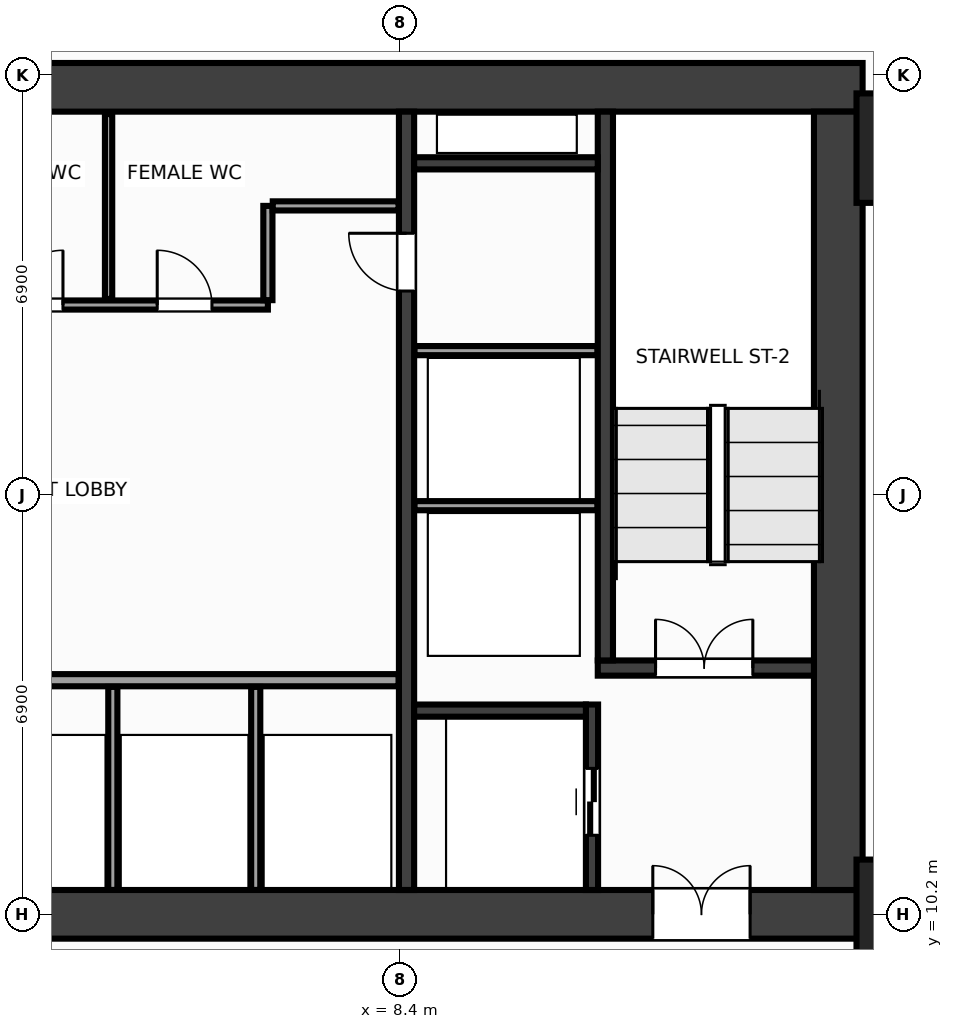
"""IFC4 building model, lengths in metres.
Left out: names, types, materials, properties, quantities, classifications, styles, units other than length and angle.
Written with IfcOpenShell. Run it as: python <this file> out.ifc"""

import sys

from ifc_helpers import new_model, si_unit, direction, frame, frame_2d, origin, origin_2d, place, context, subcontext, project, spatial, rectangle, extrude, source, transform, mapped, element, fill, save


model = new_model("IFC4")
c1 = context("Model", 3, precision=1e-05, world=origin(), true_north=direction((0.0, 1.0)))
c2 = subcontext(c1, "Body", "Model", "MODEL_VIEW")
j1 = project(units=[si_unit("LENGTHUNIT", "METRE"), si_unit("PLANEANGLEUNIT", "RADIAN")], contexts=[c1])
p1 = place(None, origin())
s1 = spatial("IfcSite", under=j1, at=p1, CompositionType="ELEMENT")
p2 = place(p1, origin())
s2 = spatial("IfcBuilding", under=s1, at=p2, CompositionType="ELEMENT")
p3 = place(p2, frame((0.0, 0.0, 52.4)))
s3 = spatial("IfcBuildingStorey", under=s2, at=p3, CompositionType="ELEMENT", Elevation=52.4)
m1 = source(origin(), c2, "Body", "SweptSolid", [
    extrude(rectangle(XDim=32.0, YDim=0.8, at=frame_2d((16.0, 0.0))), origin(), (0.0, 0.0, 1.0), 3.6),
])
p4 = place(p3, frame((-16.0, 23.8, 0.0), z_axis=(0.0, 0.0, 1.0), x_axis=(1.0, 0.0, 0.0)))
e1 = element("IfcWall", 1, at=p4, inside=s3, PredefinedType="SHEAR", context=c2, shape_type="MappedRepresentation", body=[
    mapped(m1, transform((0.0, 0.0, 0.0), x_axis=(1.0, 0.0, 0.0), y_axis=(0.0, 1.0, 0.0), z_axis=(0.0, 0.0, 1.0), scale=1.0)),
])
p5 = place(p3, frame((-16.0, 10.2, 0.0), z_axis=(0.0, 0.0, 1.0), x_axis=(1.0, 0.0, 0.0)))
e2 = element("IfcWall", 2, at=p5, inside=s3, PredefinedType="SHEAR", context=c2, shape_type="MappedRepresentation", body=[
    mapped(m1, transform((0.0, 0.0, 0.0), x_axis=(1.0, 0.0, 0.0), y_axis=(0.0, 1.0, 0.0), z_axis=(0.0, 0.0, 1.0), scale=1.0)),
])
p6 = place(p5, frame((1.85, 0.0, 0.0)))
e3 = element("IfcOpeningElement", 3, at=p6, cuts=e2, PredefinedType="OPENING", context=c2, shape_type="SweptSolid", body=[
    extrude(rectangle(XDim=1.6, YDim=2.15, at=frame_2d((0.8, 1.075))), frame((0.0, 0.412, 0.0), z_axis=(0.0, -1.0, 0.0), x_axis=(1.0, 0.0, 0.0)), (0.0, 0.0, 1.0), 0.824),
])
p7 = place(p5, frame((28.55, 0.0, 0.0)))
e4 = element("IfcOpeningElement", 4, at=p7, cuts=e2, PredefinedType="OPENING", context=c2, shape_type="SweptSolid", body=[
    extrude(rectangle(XDim=1.6, YDim=2.15, at=frame_2d((0.8, 1.075))), frame((0.0, 0.412, 0.0), z_axis=(0.0, -1.0, 0.0), x_axis=(1.0, 0.0, 0.0)), (0.0, 0.0, 1.0), 0.824),
])
p8 = place(p5, frame((15.25, 0.0, 0.0)))
e5 = element("IfcOpeningElement", 5, at=p8, cuts=e2, PredefinedType="OPENING", context=c2, shape_type="SweptSolid", body=[
    extrude(rectangle(XDim=1.5, YDim=2.2, at=frame_2d((0.75, 1.1))), frame((0.0, 0.412, 0.0), z_axis=(0.0, -1.0, 0.0), x_axis=(1.0, 0.0, 0.0)), (0.0, 0.0, 1.0), 0.824),
])
m2 = source(origin(), c2, "Body", "SweptSolid", [
    extrude(rectangle(XDim=12.8, YDim=0.8, at=frame_2d((6.4, 0.0))), origin(), (0.0, 0.0, 1.0), 3.6),
])
p9 = place(p3, frame((15.6, 10.6, 0.0), z_axis=(0.0, 0.0, 1.0), x_axis=(0.0, 1.0, 0.0)))
e6 = element("IfcWall", 6, at=p9, inside=s3, PredefinedType="SHEAR", context=c2, shape_type="MappedRepresentation", body=[
    mapped(m2, transform((0.0, 0.0, 0.0), x_axis=(1.0, 0.0, 0.0), y_axis=(0.0, 1.0, 0.0), z_axis=(0.0, 0.0, 1.0), scale=1.0)),
])
m3 = source(origin(), c2, "Body", "SweptSolid", [
    extrude(rectangle(XDim=12.8, YDim=0.25, at=frame_2d((6.4, 0.0))), origin(), (0.0, 0.0, 1.0), 3.6),
])
p10 = place(p3, frame((8.5, 10.6, 0.0), z_axis=(0.0, 0.0, 1.0), x_axis=(0.0, 1.0, 0.0)))
e7 = element("IfcWall", 7, at=p10, inside=s3, PredefinedType="SHEAR", context=c2, shape_type="MappedRepresentation", body=[
    mapped(m3, transform((0.0, 0.0, 0.0), x_axis=(1.0, 0.0, 0.0), y_axis=(0.0, 1.0, 0.0), z_axis=(0.0, 0.0, 1.0), scale=1.0)),
])
p11 = place(p10, frame((9.85, 0.0, 0.0)))
e8 = element("IfcOpeningElement", 8, at=p11, cuts=e7, PredefinedType="OPENING", context=c2, shape_type="SweptSolid", body=[
    extrude(rectangle(XDim=0.95, YDim=2.15, at=frame_2d((0.475, 1.075))), frame((0.0, 0.137, 0.0), z_axis=(0.0, -1.0, 0.0), x_axis=(1.0, 0.0, 0.0)), (0.0, 0.0, 1.0), 0.274),
])
m4 = source(origin(), c2, "Body", "SweptSolid", [
    extrude(rectangle(XDim=3.555, YDim=0.25, at=frame_2d((1.777, 0.0))), origin(), (0.0, 0.0, 1.0), 3.6),
])
p12 = place(p3, frame((11.645, 14.25, 0.0), z_axis=(0.0, 0.0, 1.0), x_axis=(1.0, 0.0, 0.0)))
e9 = element("IfcWall", 9, at=p12, inside=s3, PredefinedType="SHEAR", context=c2, shape_type="MappedRepresentation", body=[
    mapped(m4, transform((0.0, 0.0, 0.0), x_axis=(1.0, 0.0, 0.0), y_axis=(0.0, 1.0, 0.0), z_axis=(0.0, 0.0, 1.0), scale=1.0)),
])
p13 = place(p12, frame((0.95, 0.0, 0.0)))
e10 = element("IfcOpeningElement", 10, at=p13, cuts=e9, PredefinedType="OPENING", context=c2, shape_type="SweptSolid", body=[
    extrude(rectangle(XDim=1.6, YDim=2.15, at=frame_2d((0.8, 1.075))), frame((0.0, 0.137, 0.0), z_axis=(0.0, -1.0, 0.0), x_axis=(1.0, 0.0, 0.0)), (0.0, 0.0, 1.0), 0.274),
])
m5 = source(origin(), c2, "Body", "SweptSolid", [
    extrude(rectangle(XDim=9.025, YDim=0.25, at=frame_2d((4.512, 0.0))), origin(), (0.0, 0.0, 1.0), 3.6),
])
p14 = place(p3, frame((11.77, 14.375, 0.0), z_axis=(0.0, 0.0, 1.0), x_axis=(0.0, 1.0, 0.0)))
e11 = element("IfcWall", 11, at=p14, inside=s3, PredefinedType="SHEAR", context=c2, shape_type="MappedRepresentation", body=[
    mapped(m5, transform((0.0, 0.0, 0.0), x_axis=(1.0, 0.0, 0.0), y_axis=(0.0, 1.0, 0.0), z_axis=(0.0, 0.0, 1.0), scale=1.0)),
])
m6 = source(origin(), c2, "Body", "SweptSolid", [
    extrude(rectangle(XDim=3.05, YDim=0.2, at=frame_2d((1.525, 0.0))), origin(), (0.0, 0.0, 1.0), 3.6),
])
p15 = place(p3, frame((11.55, 10.6, 0.0), z_axis=(0.0, 0.0, 1.0), x_axis=(0.0, 1.0, 0.0)))
e12 = element("IfcWall", 12, at=p15, inside=s3, PredefinedType="SHEAR", context=c2, shape_type="MappedRepresentation", body=[
    mapped(m6, transform((0.0, 0.0, 0.0), x_axis=(1.0, 0.0, 0.0), y_axis=(0.0, 1.0, 0.0), z_axis=(0.0, 0.0, 1.0), scale=1.0)),
])
p16 = place(p15, frame((0.9, 0.0, 0.0)))
e13 = element("IfcOpeningElement", 13, at=p16, cuts=e12, PredefinedType="OPENING", context=c2, shape_type="SweptSolid", body=[
    extrude(rectangle(XDim=1.1, YDim=2.15, at=frame_2d((0.55, 1.075))), frame((0.0, 0.112, 0.0), z_axis=(0.0, -1.0, 0.0), x_axis=(1.0, 0.0, 0.0)), (0.0, 0.0, 1.0), 0.224),
])
m7 = source(origin(), c2, "Body", "SweptSolid", [
    extrude(rectangle(XDim=2.825, YDim=0.2, at=frame_2d((1.413, 0.0))), origin(), (0.0, 0.0, 1.0), 3.6),
])
p17 = place(p3, frame((8.625, 13.55, 0.0), z_axis=(0.0, 0.0, 1.0), x_axis=(1.0, 0.0, 0.0)))
e14 = element("IfcWall", 14, at=p17, inside=s3, PredefinedType="SHEAR", context=c2, shape_type="MappedRepresentation", body=[
    mapped(m7, transform((0.0, 0.0, 0.0), x_axis=(1.0, 0.0, 0.0), y_axis=(0.0, 1.0, 0.0), z_axis=(0.0, 0.0, 1.0), scale=1.0)),
])
m8 = source(origin(), c2, "Body", "SweptSolid", [
    extrude(rectangle(XDim=3.02, YDim=0.2, at=frame_2d((1.51, 0.0))), origin(), (0.0, 0.0, 1.0), 3.6),
])
p18 = place(p3, frame((8.625, 22.55, 0.0), z_axis=(0.0, 0.0, 1.0), x_axis=(1.0, 0.0, 0.0)))
e15 = element("IfcWall", 15, at=p18, inside=s3, PredefinedType="SHEAR", context=c2, shape_type="MappedRepresentation", body=[
    mapped(m8, transform((0.0, 0.0, 0.0), x_axis=(1.0, 0.0, 0.0), y_axis=(0.0, 1.0, 0.0), z_axis=(0.0, 0.0, 1.0), scale=1.0)),
])
m9 = source(origin(), c2, "Body", "SweptSolid", [
    extrude(rectangle(XDim=1.8, YDim=1.8, at=origin_2d()), origin(), (0.0, 0.0, 1.0), 3.6),
])
for number, where, z_axis, x_axis in (
    (16, (16.8, 10.2, 0.0), (0.0, 0.0, 1.0), (1.0, 0.0, 0.0)),
    (17, (16.8, 22.8, 0.0), (0.0, 0.0, 1.0), (1.0, 0.0, 0.0)),
):
    element("IfcColumn", number, at=place(p3, frame(where, z_axis=z_axis, x_axis=x_axis)), inside=s3, PredefinedType="COLUMN", context=c2, shape_type="MappedRepresentation", body=[
        mapped(m9, transform((0.0, 0.0, 0.0), x_axis=(1.0, 0.0, 0.0), y_axis=(0.0, 1.0, 0.0), z_axis=(0.0, 0.0, 1.0), scale=1.0)),
    ])
m10 = source(origin(), c2, "Body", "SweptSolid", [
    extrude(rectangle(XDim=3.01, YDim=0.15, at=frame_2d((1.505, 0.0))), origin(), (0.0, 0.0, 1.0), 3.36),
])
for number, where, z_axis, x_axis in (
    (18, (8.63, 16.92, 0.0), (0.0, 0.0, 1.0), (1.0, 0.0, 0.0)),
    (19, (8.63, 19.47, 0.0), (0.0, 0.0, 1.0), (1.0, 0.0, 0.0)),
):
    element("IfcWall", number, at=place(p3, frame(where, z_axis=z_axis, x_axis=x_axis)), inside=s3, PredefinedType="PARTITIONING", context=c2, shape_type="MappedRepresentation", body=[
        mapped(m10, transform((0.0, 0.0, 0.0), x_axis=(1.0, 0.0, 0.0), y_axis=(0.0, 1.0, 0.0), z_axis=(0.0, 0.0, 1.0), scale=1.0)),
    ])
m11 = source(origin(), c2, "Body", "SweptSolid", [
    extrude(rectangle(XDim=7.07, YDim=0.2, at=frame_2d((3.535, 0.0))), origin(), (0.0, 0.0, 1.0), 3.36),
])
p19 = place(p3, frame((1.3, 14.05, 0.0), z_axis=(0.0, 0.0, 1.0), x_axis=(1.0, 0.0, 0.0)))
e20 = element("IfcWall", 20, at=p19, inside=s3, PredefinedType="PARTITIONING", context=c2, shape_type="MappedRepresentation", body=[
    mapped(m11, transform((0.0, 0.0, 0.0), x_axis=(1.0, 0.0, 0.0), y_axis=(0.0, 1.0, 0.0), z_axis=(0.0, 0.0, 1.0), scale=1.0)),
])
m12 = source(origin(), c2, "Body", "SweptSolid", [
    extrude(rectangle(XDim=14.59, YDim=0.15, at=frame_2d((7.295, 0.0))), origin(), (0.0, 0.0, 1.0), 3.36),
])
p20 = place(p3, frame((-8.37, 20.22, 0.0), z_axis=(0.0, 0.0, 1.0), x_axis=(1.0, 0.0, 0.0)))
e21 = element("IfcWall", 21, at=p20, inside=s3, PredefinedType="PARTITIONING", context=c2, shape_type="MappedRepresentation", body=[
    mapped(m12, transform((0.0, 0.0, 0.0), x_axis=(1.0, 0.0, 0.0), y_axis=(0.0, 1.0, 0.0), z_axis=(0.0, 0.0, 1.0), scale=1.0)),
])
p21 = place(p20, frame((4.36, 0.0, 0.0)))
e22 = element("IfcOpeningElement", 22, at=p21, cuts=e21, PredefinedType="OPENING", context=c2, shape_type="SweptSolid", body=[
    extrude(rectangle(XDim=0.9, YDim=2.15, at=frame_2d((0.45, 1.075))), frame((0.0, 0.087, 0.0), z_axis=(0.0, -1.0, 0.0), x_axis=(1.0, 0.0, 0.0)), (0.0, 0.0, 1.0), 0.174),
])
p22 = place(p20, frame((10.32, 0.0, 0.0)))
e23 = element("IfcOpeningElement", 23, at=p22, cuts=e21, PredefinedType="OPENING", context=c2, shape_type="SweptSolid", body=[
    extrude(rectangle(XDim=0.9, YDim=2.15, at=frame_2d((0.45, 1.075))), frame((0.0, 0.087, 0.0), z_axis=(0.0, -1.0, 0.0), x_axis=(1.0, 0.0, 0.0)), (0.0, 0.0, 1.0), 0.174),
])
p23 = place(p20, frame((12.77, 0.0, 0.0)))
e24 = element("IfcOpeningElement", 24, at=p23, cuts=e21, PredefinedType="OPENING", context=c2, shape_type="SweptSolid", body=[
    extrude(rectangle(XDim=0.9, YDim=2.15, at=frame_2d((0.45, 1.075))), frame((0.0, 0.087, 0.0), z_axis=(0.0, -1.0, 0.0), x_axis=(1.0, 0.0, 0.0)), (0.0, 0.0, 1.0), 0.174),
])
m13 = source(origin(), c2, "Body", "SweptSolid", [
    extrude(rectangle(XDim=1.55, YDim=0.15, at=frame_2d((0.775, 0.0))), origin(), (0.0, 0.0, 1.0), 3.36),
])
p24 = place(p3, frame((6.22, 20.3, 0.0), z_axis=(0.0, 0.0, 1.0), x_axis=(0.0, 1.0, 0.0)))
e25 = element("IfcWall", 25, at=p24, inside=s3, PredefinedType="PARTITIONING", context=c2, shape_type="MappedRepresentation", body=[
    mapped(m13, transform((0.0, 0.0, 0.0), x_axis=(1.0, 0.0, 0.0), y_axis=(0.0, 1.0, 0.0), z_axis=(0.0, 0.0, 1.0), scale=1.0)),
])
m14 = source(origin(), c2, "Body", "SweptSolid", [
    extrude(rectangle(XDim=2.07, YDim=0.15, at=frame_2d((1.035, 0.0))), origin(), (0.0, 0.0, 1.0), 3.36),
])
p25 = place(p3, frame((6.3, 21.85, 0.0), z_axis=(0.0, 0.0, 1.0), x_axis=(1.0, 0.0, 0.0)))
e26 = element("IfcWall", 26, at=p25, inside=s3, PredefinedType="PARTITIONING", context=c2, shape_type="MappedRepresentation", body=[
    mapped(m14, transform((0.0, 0.0, 0.0), x_axis=(1.0, 0.0, 0.0), y_axis=(0.0, 1.0, 0.0), z_axis=(0.0, 0.0, 1.0), scale=1.0)),
])
m15 = source(origin(), c2, "Body", "SweptSolid", [
    extrude(rectangle(XDim=3.34, YDim=0.15, at=frame_2d((1.67, 0.0))), origin(), (0.0, 0.0, 1.0), 3.36),
])
for number, where, z_axis, x_axis in (
    (27, (3.67, 10.6, 0.0), (0.0, 0.0, 1.0), (0.0, 1.0, 0.0)),
    (28, (6.02, 10.6, 0.0), (0.0, 0.0, 1.0), (0.0, 1.0, 0.0)),
):
    element("IfcWall", number, at=place(p3, frame(where, z_axis=z_axis, x_axis=x_axis)), inside=s3, PredefinedType="PARTITIONING", context=c2, shape_type="MappedRepresentation", body=[
        mapped(m15, transform((0.0, 0.0, 0.0), x_axis=(1.0, 0.0, 0.0), y_axis=(0.0, 1.0, 0.0), z_axis=(0.0, 0.0, 1.0), scale=1.0)),
    ])
m16 = source(origin(), c2, "Body", "SweptSolid", [
    extrude(rectangle(XDim=3.04, YDim=0.12, at=frame_2d((1.52, 0.0))), origin(), (0.0, 0.0, 1.0), 3.36),
])
p26 = place(p3, frame((3.6, 20.32, 0.0), z_axis=(0.0, 0.0, 1.0), x_axis=(0.0, 1.0, 0.0)))
e29 = element("IfcWall", 29, at=p26, inside=s3, PredefinedType="PARTITIONING", context=c2, shape_type="MappedRepresentation", body=[
    mapped(m16, transform((0.0, 0.0, 0.0), x_axis=(1.0, 0.0, 0.0), y_axis=(0.0, 1.0, 0.0), z_axis=(0.0, 0.0, 1.0), scale=1.0)),
])
m17 = source(origin(), c2, "Body", "SweptSolid", [
    extrude(rectangle(XDim=1.6, YDim=2.15, at=frame_2d((0.8, 1.075))), frame((0.0, 0.025, 0.0), z_axis=(0.0, -1.0, 0.0), x_axis=(1.0, 0.0, 0.0)), (0.0, 0.0, 1.0), 0.05),
])
p27 = place(p13, origin())
e30 = element("IfcDoor", 30, at=p27, inside=s3, OperationType="DOUBLE_DOOR_SINGLE_SWING", PredefinedType="DOOR", context=c2, shape_type="MappedRepresentation", body=[
    mapped(m17, transform((0.0, 0.0, 0.0), x_axis=(1.0, 0.0, 0.0), y_axis=(0.0, 1.0, 0.0), z_axis=(0.0, 0.0, 1.0), scale=1.0)),
])
fill(e10, e30)
p28 = place(p7, origin())
e31 = element("IfcDoor", 31, at=p28, inside=s3, OperationType="DOUBLE_DOOR_SINGLE_SWING", PredefinedType="DOOR", context=c2, shape_type="MappedRepresentation", body=[
    mapped(m17, transform((0.0, 0.0, 0.0), x_axis=(1.0, 0.0, 0.0), y_axis=(0.0, 1.0, 0.0), z_axis=(0.0, 0.0, 1.0), scale=1.0)),
])
fill(e4, e31)
m18 = source(origin(), c2, "Body", "SweptSolid", [
    extrude(rectangle(XDim=1.1, YDim=2.15, at=frame_2d((0.55, 1.075))), frame((0.0, 0.025, 0.0), z_axis=(0.0, -1.0, 0.0), x_axis=(1.0, 0.0, 0.0)), (0.0, 0.0, 1.0), 0.05),
])
p29 = place(p16, origin())
e32 = element("IfcDoor", 32, at=p29, inside=s3, OperationType="DOUBLE_DOOR_SLIDING", PredefinedType="DOOR", context=c2, shape_type="MappedRepresentation", body=[
    mapped(m18, transform((0.0, 0.0, 0.0), x_axis=(1.0, 0.0, 0.0), y_axis=(0.0, 1.0, 0.0), z_axis=(0.0, 0.0, 1.0), scale=1.0)),
])
fill(e13, e32)
m19 = source(origin(), c2, "Body", "SweptSolid", [
    extrude(rectangle(XDim=0.95, YDim=2.15, at=frame_2d((0.475, 1.075))), frame((0.0, 0.025, 0.0), z_axis=(0.0, -1.0, 0.0), x_axis=(1.0, 0.0, 0.0)), (0.0, 0.0, 1.0), 0.05),
])
p30 = place(p11, origin())
e33 = element("IfcDoor", 33, at=p30, inside=s3, OperationType="SINGLE_SWING_RIGHT", PredefinedType="DOOR", context=c2, shape_type="MappedRepresentation", body=[
    mapped(m19, transform((0.0, 0.0, 0.0), x_axis=(1.0, 0.0, 0.0), y_axis=(0.0, 1.0, 0.0), z_axis=(0.0, 0.0, 1.0), scale=1.0)),
])
fill(e8, e33)
m20 = source(origin(), c2, "Body", "SweptSolid", [
    extrude(rectangle(XDim=0.9, YDim=2.15, at=frame_2d((0.45, 1.075))), frame((0.0, 0.025, 0.0), z_axis=(0.0, -1.0, 0.0), x_axis=(1.0, 0.0, 0.0)), (0.0, 0.0, 1.0), 0.05),
])
p31 = place(p22, origin())
e34 = element("IfcDoor", 34, at=p31, inside=s3, OperationType="SINGLE_SWING_RIGHT", PredefinedType="DOOR", context=c2, shape_type="MappedRepresentation", body=[
    mapped(m20, transform((0.0, 0.0, 0.0), x_axis=(1.0, 0.0, 0.0), y_axis=(0.0, 1.0, 0.0), z_axis=(0.0, 0.0, 1.0), scale=1.0)),
])
fill(e23, e34)
p32 = place(p23, origin())
e35 = element("IfcDoor", 35, at=p32, inside=s3, OperationType="SINGLE_SWING_LEFT", PredefinedType="DOOR", context=c2, shape_type="MappedRepresentation", body=[
    mapped(m20, transform((0.0, 0.0, 0.0), x_axis=(1.0, 0.0, 0.0), y_axis=(0.0, 1.0, 0.0), z_axis=(0.0, 0.0, 1.0), scale=1.0)),
])
fill(e24, e35)
save(model, sys.argv[1])
